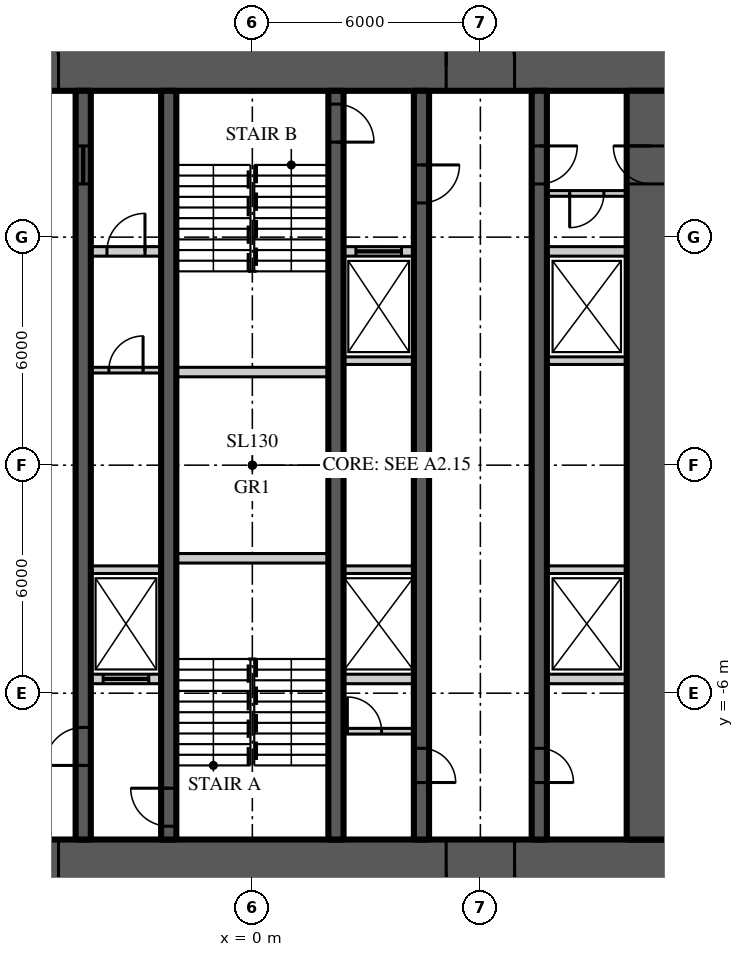
"""IFC4 building model, lengths in metres.
Left out: names, types, materials, properties, quantities, classifications, styles, units other than length and angle.
Written with IfcOpenShell. Run it as: python <this file> out.ifc"""

import sys

from ifc_helpers import new_model, si_unit, direction, frame, frame_2d, origin, place, context, subcontext, project, spatial, rectangle, extrude, element, fill, save


model = new_model("IFC4")
c1 = context("Model", 3, precision=1e-05, world=origin(), true_north=direction((0.0, 1.0)))
c2 = subcontext(c1, "Body", "Model", "MODEL_VIEW")
j1 = project(units=[si_unit("LENGTHUNIT", "METRE"), si_unit("PLANEANGLEUNIT", "RADIAN")], contexts=[c1])
p1 = place(None, origin())
s1 = spatial("IfcSite", under=j1, at=p1, CompositionType="ELEMENT")
p2 = place(p1, origin())
s2 = spatial("IfcBuilding", under=s1, at=p2, CompositionType="ELEMENT")
p3 = place(p2, frame((0.0, 0.0, 105.9)))
s3 = spatial("IfcBuildingStorey", under=s2, at=p3, CompositionType="ELEMENT", Elevation=105.9)
p4 = place(p3, frame((-11.15, 10.5, 0.0), z_axis=(0.0, 0.0, 1.0), x_axis=(1.0, 0.0, 0.0)))
e1 = element("IfcWall", 1, at=p4, inside=s3, PredefinedType="SHEAR", context=c2, shape_type="SweptSolid", body=[
    extrude(rectangle(XDim=22.3, YDim=1.3, at=frame_2d((11.15, 0.0))), origin(), (0.0, 0.0, 1.0), 3.9),
])
p5 = place(p4, frame((4.25, 0.0, 0.0)))
e2 = element("IfcOpeningElement", 2, at=p5, cuts=e1, PredefinedType="OPENING", context=c2, shape_type="SweptSolid", body=[
    extrude(rectangle(XDim=1.8, YDim=2.2, at=frame_2d((0.9, 1.1))), frame((0.0, 0.66, 0.0), z_axis=(0.0, -1.0, 0.0), x_axis=(1.0, 0.0, 0.0)), (0.0, 0.0, 1.0), 1.32),
])
p6 = place(p4, frame((16.25, 0.0, 0.0)))
e3 = element("IfcOpeningElement", 3, at=p6, cuts=e1, PredefinedType="OPENING", context=c2, shape_type="SweptSolid", body=[
    extrude(rectangle(XDim=1.8, YDim=2.2, at=frame_2d((0.9, 1.1))), frame((0.0, 0.66, 0.0), z_axis=(0.0, -1.0, 0.0), x_axis=(1.0, 0.0, 0.0)), (0.0, 0.0, 1.0), 1.32),
])
p7 = place(p3, frame((11.15, -10.5, 0.0), z_axis=(0.0, 0.0, 1.0), x_axis=(-1.0, 0.0, 0.0)))
e4 = element("IfcWall", 4, at=p7, inside=s3, PredefinedType="SHEAR", context=c2, shape_type="SweptSolid", body=[
    extrude(rectangle(XDim=22.3, YDim=1.3, at=frame_2d((11.15, 0.0))), origin(), (0.0, 0.0, 1.0), 3.9),
])
p8 = place(p7, frame((16.25, 0.0, 0.0)))
e5 = element("IfcOpeningElement", 5, at=p8, cuts=e4, PredefinedType="OPENING", context=c2, shape_type="SweptSolid", body=[
    extrude(rectangle(XDim=1.8, YDim=2.2, at=frame_2d((0.9, 1.1))), frame((0.0, 0.66, 0.0), z_axis=(0.0, -1.0, 0.0), x_axis=(1.0, 0.0, 0.0)), (0.0, 0.0, 1.0), 1.32),
])
p9 = place(p7, frame((4.25, 0.0, 0.0)))
e6 = element("IfcOpeningElement", 6, at=p9, cuts=e4, PredefinedType="OPENING", context=c2, shape_type="SweptSolid", body=[
    extrude(rectangle(XDim=1.8, YDim=2.2, at=frame_2d((0.9, 1.1))), frame((0.0, 0.66, 0.0), z_axis=(0.0, -1.0, 0.0), x_axis=(1.0, 0.0, 0.0)), (0.0, 0.0, 1.0), 1.32),
])
p10 = place(p3, frame((10.5, -9.85, 0.0), z_axis=(0.0, 0.0, 1.0), x_axis=(0.0, 1.0, 0.0)))
e7 = element("IfcWall", 7, at=p10, inside=s3, PredefinedType="SHEAR", context=c2, shape_type="SweptSolid", body=[
    extrude(rectangle(XDim=19.7, YDim=1.3, at=frame_2d((9.85, 0.0))), origin(), (0.0, 0.0, 1.0), 3.9),
])
p11 = place(p10, frame((17.25, 0.0, 0.0)))
e8 = element("IfcOpeningElement", 8, at=p11, cuts=e7, PredefinedType="OPENING", context=c2, shape_type="SweptSolid", body=[
    extrude(rectangle(XDim=1.0, YDim=2.2, at=frame_2d((0.5, 1.1))), frame((0.0, 0.66, 0.0), z_axis=(0.0, -1.0, 0.0), x_axis=(1.0, 0.0, 0.0)), (0.0, 0.0, 1.0), 1.32),
])
p12 = place(p3, frame((7.55, 9.85, 0.0), z_axis=(0.0, 0.0, 1.0), x_axis=(0.0, -1.0, 0.0)))
e9 = element("IfcWall", 9, at=p12, inside=s3, PredefinedType="SHEAR", context=c2, shape_type="SweptSolid", body=[
    extrude(rectangle(XDim=19.7, YDim=0.4, at=frame_2d((9.85, 0.0))), origin(), (0.0, 0.0, 1.0), 3.9),
])
p13 = place(p12, frame((1.45, 0.0, 0.0)))
e10 = element("IfcOpeningElement", 10, at=p13, cuts=e9, PredefinedType="OPENING", context=c2, shape_type="SweptSolid", body=[
    extrude(rectangle(XDim=1.0, YDim=2.2, at=frame_2d((0.5, 1.1))), frame((0.0, 0.21, 0.0), z_axis=(0.0, -1.0, 0.0), x_axis=(1.0, 0.0, 0.0)), (0.0, 0.0, 1.0), 0.42),
])
p14 = place(p12, frame((17.3, 0.0, 0.0)))
e11 = element("IfcOpeningElement", 11, at=p14, cuts=e9, PredefinedType="OPENING", context=c2, shape_type="SweptSolid", body=[
    extrude(rectangle(XDim=0.9, YDim=2.1, at=frame_2d((0.45, 1.05))), frame((0.0, 0.21, 0.0), z_axis=(0.0, -1.0, 0.0), x_axis=(1.0, 0.0, 0.0)), (0.0, 0.0, 1.0), 0.42),
])
p15 = place(p3, frame((-4.45, -9.85, 0.0), z_axis=(0.0, 0.0, 1.0), x_axis=(0.0, 1.0, 0.0)))
e12 = element("IfcWall", 12, at=p15, inside=s3, PredefinedType="SHEAR", context=c2, shape_type="SweptSolid", body=[
    extrude(rectangle(XDim=19.7, YDim=0.4, at=frame_2d((9.85, 0.0))), origin(), (0.0, 0.0, 1.0), 3.9),
])
p16 = place(p15, frame((1.95, 0.0, 0.0)))
e13 = element("IfcOpeningElement", 13, at=p16, cuts=e12, PredefinedType="OPENING", context=c2, shape_type="SweptSolid", body=[
    extrude(rectangle(XDim=1.0, YDim=2.2, at=frame_2d((0.5, 1.1))), frame((0.0, 0.21, 0.0), z_axis=(0.0, -1.0, 0.0), x_axis=(1.0, 0.0, 0.0)), (0.0, 0.0, 1.0), 0.42),
])
p17 = place(p15, frame((17.25, 0.0, 0.0)))
e14 = element("IfcOpeningElement", 14, at=p17, cuts=e12, PredefinedType="OPENING", context=c2, shape_type="SweptSolid", body=[
    extrude(rectangle(XDim=1.0, YDim=2.1, at=frame_2d((0.5, 1.05))), frame((0.0, 0.21, 0.0), z_axis=(0.0, -1.0, 0.0), x_axis=(1.0, 0.0, 0.0)), (0.0, 0.0, 1.0), 0.42),
])
p18 = place(p3, frame((4.45, 9.85, 0.0), z_axis=(0.0, 0.0, 1.0), x_axis=(0.0, -1.0, 0.0)))
e15 = element("IfcWall", 15, at=p18, inside=s3, PredefinedType="SHEAR", context=c2, shape_type="SweptSolid", body=[
    extrude(rectangle(XDim=19.7, YDim=0.4, at=frame_2d((9.85, 0.0))), origin(), (0.0, 0.0, 1.0), 3.9),
])
p19 = place(p18, frame((1.95, 0.0, 0.0)))
e16 = element("IfcOpeningElement", 16, at=p19, cuts=e15, PredefinedType="OPENING", context=c2, shape_type="SweptSolid", body=[
    extrude(rectangle(XDim=1.0, YDim=2.2, at=frame_2d((0.5, 1.1))), frame((0.0, 0.21, 0.0), z_axis=(0.0, -1.0, 0.0), x_axis=(1.0, 0.0, 0.0)), (0.0, 0.0, 1.0), 0.42),
])
p20 = place(p18, frame((17.3, 0.0, 0.0)))
e17 = element("IfcOpeningElement", 17, at=p20, cuts=e15, PredefinedType="OPENING", context=c2, shape_type="SweptSolid", body=[
    extrude(rectangle(XDim=0.9, YDim=2.1, at=frame_2d((0.45, 1.05))), frame((0.0, 0.21, 0.0), z_axis=(0.0, -1.0, 0.0), x_axis=(1.0, 0.0, 0.0)), (0.0, 0.0, 1.0), 0.42),
])
p21 = place(p3, frame((-2.2, -9.85, 0.0), z_axis=(0.0, 0.0, 1.0), x_axis=(0.0, 1.0, 0.0)))
e18 = element("IfcWall", 18, at=p21, inside=s3, PredefinedType="SHEAR", context=c2, shape_type="SweptSolid", body=[
    extrude(rectangle(XDim=19.7, YDim=0.4, at=frame_2d((9.85, 0.0))), origin(), (0.0, 0.0, 1.0), 3.9),
])
p22 = place(p21, frame((0.35, 0.0, 0.0)))
e19 = element("IfcOpeningElement", 19, at=p22, cuts=e18, PredefinedType="OPENING", context=c2, shape_type="SweptSolid", body=[
    extrude(rectangle(XDim=1.0, YDim=2.2, at=frame_2d((0.5, 1.1))), frame((0.0, 0.21, 0.0), z_axis=(0.0, -1.0, 0.0), x_axis=(1.0, 0.0, 0.0)), (0.0, 0.0, 1.0), 0.42),
])
p23 = place(p3, frame((2.2, 9.85, 0.0), z_axis=(0.0, 0.0, 1.0), x_axis=(0.0, -1.0, 0.0)))
e20 = element("IfcWall", 20, at=p23, inside=s3, PredefinedType="SHEAR", context=c2, shape_type="SweptSolid", body=[
    extrude(rectangle(XDim=19.7, YDim=0.4, at=frame_2d((9.85, 0.0))), origin(), (0.0, 0.0, 1.0), 3.9),
])
p24 = place(p23, frame((0.35, 0.0, 0.0)))
e21 = element("IfcOpeningElement", 21, at=p24, cuts=e20, PredefinedType="OPENING", context=c2, shape_type="SweptSolid", body=[
    extrude(rectangle(XDim=1.0, YDim=2.2, at=frame_2d((0.5, 1.1))), frame((0.0, 0.21, 0.0), z_axis=(0.0, -1.0, 0.0), x_axis=(1.0, 0.0, 0.0)), (0.0, 0.0, 1.0), 0.42),
])
p25 = place(p3, frame((-4.25, 5.625, 0.0), z_axis=(0.0, 0.0, 1.0), x_axis=(1.0, 0.0, 0.0)))
e22 = element("IfcWall", 22, at=p25, inside=s3, PredefinedType="SOLIDWALL", context=c2, shape_type="SweptSolid", body=[
    extrude(rectangle(XDim=1.85, YDim=0.25, at=frame_2d((0.925, 0.0))), origin(), (0.0, 0.0, 1.0), 3.7),
])
p26 = place(p25, frame((0.425, 0.0, 0.0)))
e23 = element("IfcOpeningElement", 23, at=p26, cuts=e22, PredefinedType="OPENING", context=c2, shape_type="SweptSolid", body=[
    extrude(rectangle(XDim=1.0, YDim=2.2, at=frame_2d((0.5, 1.1))), frame((0.0, 0.135, 0.0), z_axis=(0.0, -1.0, 0.0), x_axis=(1.0, 0.0, 0.0)), (0.0, 0.0, 1.0), 0.27),
])
p27 = place(p3, frame((2.4, 5.625, 0.0), z_axis=(0.0, 0.0, 1.0), x_axis=(1.0, 0.0, 0.0)))
e24 = element("IfcWall", 24, at=p27, inside=s3, PredefinedType="SOLIDWALL", context=c2, shape_type="SweptSolid", body=[
    extrude(rectangle(XDim=1.85, YDim=0.25, at=frame_2d((0.925, 0.0))), origin(), (0.0, 0.0, 1.0), 3.7),
])
p28 = place(p27, frame((0.325, 0.0, 0.0)))
e25 = element("IfcOpeningElement", 25, at=p28, cuts=e24, PredefinedType="OPENING", context=c2, shape_type="SweptSolid", body=[
    extrude(rectangle(XDim=1.2, YDim=2.2, at=frame_2d((0.6, 1.1))), frame((0.0, 0.135, 0.0), z_axis=(0.0, -1.0, 0.0), x_axis=(1.0, 0.0, 0.0)), (0.0, 0.0, 1.0), 0.27),
])
p29 = place(p3, frame((7.75, 5.625, 0.0), z_axis=(0.0, 0.0, 1.0), x_axis=(1.0, 0.0, 0.0)))
e26 = element("IfcWall", 26, at=p29, inside=s3, PredefinedType="SOLIDWALL", context=c2, shape_type="SweptSolid", body=[
    extrude(rectangle(XDim=2.1, YDim=0.25, at=frame_2d((1.05, 0.0))), origin(), (0.0, 0.0, 1.0), 3.7),
])
p30 = place(p3, frame((-4.25, -5.625, 0.0), z_axis=(0.0, 0.0, 1.0), x_axis=(1.0, 0.0, 0.0)))
e27 = element("IfcWall", 27, at=p30, inside=s3, PredefinedType="SOLIDWALL", context=c2, shape_type="SweptSolid", body=[
    extrude(rectangle(XDim=1.85, YDim=0.25, at=frame_2d((0.925, 0.0))), origin(), (0.0, 0.0, 1.0), 3.7),
])
p31 = place(p30, frame((0.325, 0.0, 0.0)))
e28 = element("IfcOpeningElement", 28, at=p31, cuts=e27, PredefinedType="OPENING", context=c2, shape_type="SweptSolid", body=[
    extrude(rectangle(XDim=1.2, YDim=2.2, at=frame_2d((0.6, 1.1))), frame((0.0, 0.135, 0.0), z_axis=(0.0, -1.0, 0.0), x_axis=(1.0, 0.0, 0.0)), (0.0, 0.0, 1.0), 0.27),
])
p32 = place(p3, frame((2.4, -5.625, 0.0), z_axis=(0.0, 0.0, 1.0), x_axis=(1.0, 0.0, 0.0)))
e29 = element("IfcWall", 29, at=p32, inside=s3, PredefinedType="SOLIDWALL", context=c2, shape_type="SweptSolid", body=[
    extrude(rectangle(XDim=1.85, YDim=0.25, at=frame_2d((0.925, 0.0))), origin(), (0.0, 0.0, 1.0), 3.7),
])
p33 = place(p3, frame((7.75, -5.625, 0.0), z_axis=(0.0, 0.0, 1.0), x_axis=(1.0, 0.0, 0.0)))
e30 = element("IfcWall", 30, at=p33, inside=s3, PredefinedType="SOLIDWALL", context=c2, shape_type="SweptSolid", body=[
    extrude(rectangle(XDim=2.1, YDim=0.25, at=frame_2d((1.05, 0.0))), origin(), (0.0, 0.0, 1.0), 3.7),
])
for number, where, z_axis, x_axis in (
    (31, (-2.0, -2.45, 0.0), (0.0, 0.0, 1.0), (1.0, 0.0, 0.0)),
    (32, (-2.0, 2.45, 0.0), (0.0, 0.0, 1.0), (1.0, 0.0, 0.0)),
):
    element("IfcWall", number, at=place(p3, frame(where, z_axis=z_axis, x_axis=x_axis)), inside=s3, PredefinedType="SOLIDWALL", context=c2, shape_type="SweptSolid", body=[
        extrude(rectangle(XDim=4.0, YDim=0.25, at=frame_2d((2.0, 0.0))), origin(), (0.0, 0.0, 1.0), 3.7),
    ])
for number, where, z_axis, x_axis in (
    (33, (-4.25, -2.75, 0.0), (0.0, 0.0, 1.0), (1.0, 0.0, 0.0)),
    (34, (2.4, -2.75, 0.0), (0.0, 0.0, 1.0), (1.0, 0.0, 0.0)),
):
    element("IfcWall", number, at=place(p3, frame(where, z_axis=z_axis, x_axis=x_axis)), inside=s3, PredefinedType="SOLIDWALL", context=c2, shape_type="SweptSolid", body=[
        extrude(rectangle(XDim=1.85, YDim=0.2, at=frame_2d((0.925, 0.0))), origin(), (0.0, 0.0, 1.0), 3.7),
    ])
p34 = place(p3, frame((7.75, -2.75, 0.0), z_axis=(0.0, 0.0, 1.0), x_axis=(1.0, 0.0, 0.0)))
e35 = element("IfcWall", 35, at=p34, inside=s3, PredefinedType="SOLIDWALL", context=c2, shape_type="SweptSolid", body=[
    extrude(rectangle(XDim=2.1, YDim=0.2, at=frame_2d((1.05, 0.0))), origin(), (0.0, 0.0, 1.0), 3.7),
])
p35 = place(p3, frame((2.4, 2.75, 0.0), z_axis=(0.0, 0.0, 1.0), x_axis=(1.0, 0.0, 0.0)))
e36 = element("IfcWall", 36, at=p35, inside=s3, PredefinedType="SOLIDWALL", context=c2, shape_type="SweptSolid", body=[
    extrude(rectangle(XDim=1.85, YDim=0.2, at=frame_2d((0.925, 0.0))), origin(), (0.0, 0.0, 1.0), 3.7),
])
p36 = place(p3, frame((7.75, 2.75, 0.0), z_axis=(0.0, 0.0, 1.0), x_axis=(1.0, 0.0, 0.0)))
e37 = element("IfcWall", 37, at=p36, inside=s3, PredefinedType="SOLIDWALL", context=c2, shape_type="SweptSolid", body=[
    extrude(rectangle(XDim=2.1, YDim=0.2, at=frame_2d((1.05, 0.0))), origin(), (0.0, 0.0, 1.0), 3.7),
])
p37 = place(p3, frame((-4.25, 2.5, 0.0), z_axis=(0.0, 0.0, 1.0), x_axis=(1.0, 0.0, 0.0)))
e38 = element("IfcWall", 38, at=p37, inside=s3, PredefinedType="SOLIDWALL", context=c2, shape_type="SweptSolid", body=[
    extrude(rectangle(XDim=1.85, YDim=0.15, at=frame_2d((0.925, 0.0))), origin(), (0.0, 0.0, 1.0), 3.77),
])
p38 = place(p37, frame((0.475, 0.0, 0.0)))
e39 = element("IfcOpeningElement", 39, at=p38, cuts=e38, PredefinedType="OPENING", context=c2, shape_type="SweptSolid", body=[
    extrude(rectangle(XDim=0.9, YDim=2.1, at=frame_2d((0.45, 1.05))), frame((0.0, 0.085, 0.0), z_axis=(0.0, -1.0, 0.0), x_axis=(1.0, 0.0, 0.0)), (0.0, 0.0, 1.0), 0.17),
])
p39 = place(p3, frame((2.4, -7.0, 0.0), z_axis=(0.0, 0.0, 1.0), x_axis=(1.0, 0.0, 0.0)))
e40 = element("IfcWall", 40, at=p39, inside=s3, PredefinedType="SOLIDWALL", context=c2, shape_type="SweptSolid", body=[
    extrude(rectangle(XDim=1.85, YDim=0.15, at=frame_2d((0.925, 0.0))), origin(), (0.0, 0.0, 1.0), 3.77),
])
p40 = place(p39, frame((0.1, 0.0, 0.0)))
e41 = element("IfcOpeningElement", 41, at=p40, cuts=e40, PredefinedType="OPENING", context=c2, shape_type="SweptSolid", body=[
    extrude(rectangle(XDim=0.9, YDim=2.1, at=frame_2d((0.45, 1.05))), frame((0.0, 0.085, 0.0), z_axis=(0.0, -1.0, 0.0), x_axis=(1.0, 0.0, 0.0)), (0.0, 0.0, 1.0), 0.17),
])
p41 = place(p3, frame((9.85, 7.15, 0.0), z_axis=(0.0, 0.0, 1.0), x_axis=(-1.0, 0.0, 0.0)))
e42 = element("IfcWall", 42, at=p41, inside=s3, PredefinedType="SOLIDWALL", context=c2, shape_type="SweptSolid", body=[
    extrude(rectangle(XDim=2.1, YDim=0.15, at=frame_2d((1.05, 0.0))), origin(), (0.0, 0.0, 1.0), 3.77),
])
p42 = place(p41, frame((0.6, 0.0, 0.0)))
e43 = element("IfcOpeningElement", 43, at=p42, cuts=e42, PredefinedType="OPENING", context=c2, shape_type="SweptSolid", body=[
    extrude(rectangle(XDim=0.9, YDim=2.1, at=frame_2d((0.45, 1.05))), frame((0.0, 0.085, 0.0), z_axis=(0.0, -1.0, 0.0), x_axis=(1.0, 0.0, 0.0)), (0.0, 0.0, 1.0), 0.17),
])
p43 = place(p5, origin())
e44 = element("IfcDoor", 44, at=p43, inside=s3, OperationType="DOUBLE_DOOR_DOUBLE_SWING", PredefinedType="DOOR", context=c2, shape_type="SweptSolid", body=[
    extrude(rectangle(XDim=1.8, YDim=2.2, at=frame_2d((0.9, 1.1))), frame((0.0, 0.025, 0.0), z_axis=(0.0, -1.0, 0.0), x_axis=(1.0, 0.0, 0.0)), (0.0, 0.0, 1.0), 0.05),
])
fill(e2, e44)
p44 = place(p8, origin())
e45 = element("IfcDoor", 45, at=p44, inside=s3, OperationType="DOUBLE_DOOR_DOUBLE_SWING", PredefinedType="DOOR", context=c2, shape_type="SweptSolid", body=[
    extrude(rectangle(XDim=1.8, YDim=2.2, at=frame_2d((0.9, 1.1))), frame((0.0, 0.025, 0.0), z_axis=(0.0, -1.0, 0.0), x_axis=(1.0, 0.0, 0.0)), (0.0, 0.0, 1.0), 0.05),
])
fill(e5, e45)
p45 = place(p6, origin())
e46 = element("IfcDoor", 46, at=p45, inside=s3, OperationType="DOUBLE_DOOR_DOUBLE_SWING", PredefinedType="DOOR", context=c2, shape_type="SweptSolid", body=[
    extrude(rectangle(XDim=1.8, YDim=2.2, at=frame_2d((0.9, 1.1))), frame((0.0, 0.025, 0.0), z_axis=(0.0, -1.0, 0.0), x_axis=(1.0, 0.0, 0.0)), (0.0, 0.0, 1.0), 0.05),
])
fill(e3, e46)
p46 = place(p9, origin())
e47 = element("IfcDoor", 47, at=p46, inside=s3, OperationType="DOUBLE_DOOR_DOUBLE_SWING", PredefinedType="DOOR", context=c2, shape_type="SweptSolid", body=[
    extrude(rectangle(XDim=1.8, YDim=2.2, at=frame_2d((0.9, 1.1))), frame((0.0, 0.025, 0.0), z_axis=(0.0, -1.0, 0.0), x_axis=(1.0, 0.0, 0.0)), (0.0, 0.0, 1.0), 0.05),
])
fill(e6, e47)
p47 = place(p13, origin())
e48 = element("IfcDoor", 48, at=p47, inside=s3, OperationType="SINGLE_SWING_LEFT", PredefinedType="DOOR", context=c2, shape_type="SweptSolid", body=[
    extrude(rectangle(XDim=1.0, YDim=2.2, at=frame_2d((0.5, 1.1))), frame((0.0, 0.025, 0.0), z_axis=(0.0, -1.0, 0.0), x_axis=(1.0, 0.0, 0.0)), (0.0, 0.0, 1.0), 0.05),
])
fill(e10, e48)
p48 = place(p11, origin())
e49 = element("IfcDoor", 49, at=p48, inside=s3, OperationType="SINGLE_SWING_RIGHT", PredefinedType="DOOR", context=c2, shape_type="SweptSolid", body=[
    extrude(rectangle(XDim=1.0, YDim=2.2, at=frame_2d((0.5, 1.1))), frame((0.0, 0.025, 0.0), z_axis=(0.0, -1.0, 0.0), x_axis=(1.0, 0.0, 0.0)), (0.0, 0.0, 1.0), 0.05),
])
fill(e8, e49)
p49 = place(p16, origin())
e50 = element("IfcDoor", 50, at=p49, inside=s3, OperationType="SINGLE_SWING_LEFT", PredefinedType="DOOR", context=c2, shape_type="SweptSolid", body=[
    extrude(rectangle(XDim=1.0, YDim=2.2, at=frame_2d((0.5, 1.1))), frame((0.0, 0.025, 0.0), z_axis=(0.0, -1.0, 0.0), x_axis=(1.0, 0.0, 0.0)), (0.0, 0.0, 1.0), 0.05),
])
fill(e13, e50)
p50 = place(p22, origin())
e51 = element("IfcDoor", 51, at=p50, inside=s3, OperationType="SINGLE_SWING_RIGHT", PredefinedType="DOOR", context=c2, shape_type="SweptSolid", body=[
    extrude(rectangle(XDim=1.0, YDim=2.2, at=frame_2d((0.5, 1.1))), frame((0.0, 0.025, 0.0), z_axis=(0.0, -1.0, 0.0), x_axis=(1.0, 0.0, 0.0)), (0.0, 0.0, 1.0), 0.05),
])
fill(e19, e51)
p51 = place(p19, origin())
e52 = element("IfcDoor", 52, at=p51, inside=s3, OperationType="SINGLE_SWING_LEFT", PredefinedType="DOOR", context=c2, shape_type="SweptSolid", body=[
    extrude(rectangle(XDim=1.0, YDim=2.2, at=frame_2d((0.5, 1.1))), frame((0.0, 0.025, 0.0), z_axis=(0.0, -1.0, 0.0), x_axis=(1.0, 0.0, 0.0)), (0.0, 0.0, 1.0), 0.05),
])
fill(e16, e52)
p52 = place(p24, origin())
e53 = element("IfcDoor", 53, at=p52, inside=s3, OperationType="SINGLE_SWING_RIGHT", PredefinedType="DOOR", context=c2, shape_type="SweptSolid", body=[
    extrude(rectangle(XDim=1.0, YDim=2.2, at=frame_2d((0.5, 1.1))), frame((0.0, 0.025, 0.0), z_axis=(0.0, -1.0, 0.0), x_axis=(1.0, 0.0, 0.0)), (0.0, 0.0, 1.0), 0.05),
])
fill(e21, e53)
p53 = place(p17, origin())
e54 = element("IfcDoor", 54, at=p53, inside=s3, OperationType="SLIDING_TO_LEFT", PredefinedType="DOOR", context=c2, shape_type="SweptSolid", body=[
    extrude(rectangle(XDim=1.0, YDim=2.1, at=frame_2d((0.5, 1.05))), frame((0.0, 0.025, 0.0), z_axis=(0.0, -1.0, 0.0), x_axis=(1.0, 0.0, 0.0)), (0.0, 0.0, 1.0), 0.05),
])
fill(e14, e54)
p54 = place(p14, origin())
e55 = element("IfcDoor", 55, at=p54, inside=s3, OperationType="SINGLE_SWING_RIGHT", PredefinedType="DOOR", context=c2, shape_type="SweptSolid", body=[
    extrude(rectangle(XDim=0.9, YDim=2.1, at=frame_2d((0.45, 1.05))), frame((0.0, 0.025, 0.0), z_axis=(0.0, -1.0, 0.0), x_axis=(1.0, 0.0, 0.0)), (0.0, 0.0, 1.0), 0.05),
])
fill(e11, e55)
p55 = place(p20, origin())
e56 = element("IfcDoor", 56, at=p55, inside=s3, OperationType="SINGLE_SWING_RIGHT", PredefinedType="DOOR", context=c2, shape_type="SweptSolid", body=[
    extrude(rectangle(XDim=0.9, YDim=2.1, at=frame_2d((0.45, 1.05))), frame((0.0, 0.025, 0.0), z_axis=(0.0, -1.0, 0.0), x_axis=(1.0, 0.0, 0.0)), (0.0, 0.0, 1.0), 0.05),
])
fill(e17, e56)
p56 = place(p31, origin())
e57 = element("IfcDoor", 57, at=p56, inside=s3, OperationType="SLIDING_TO_LEFT", PredefinedType="DOOR", context=c2, shape_type="SweptSolid", body=[
    extrude(rectangle(XDim=1.2, YDim=2.2, at=frame_2d((0.6, 1.1))), frame((0.0, 0.025, 0.0), z_axis=(0.0, -1.0, 0.0), x_axis=(1.0, 0.0, 0.0)), (0.0, 0.0, 1.0), 0.05),
])
fill(e28, e57)
p57 = place(p28, origin())
e58 = element("IfcDoor", 58, at=p57, inside=s3, OperationType="SLIDING_TO_LEFT", PredefinedType="DOOR", context=c2, shape_type="SweptSolid", body=[
    extrude(rectangle(XDim=1.2, YDim=2.2, at=frame_2d((0.6, 1.1))), frame((0.0, 0.025, 0.0), z_axis=(0.0, -1.0, 0.0), x_axis=(1.0, 0.0, 0.0)), (0.0, 0.0, 1.0), 0.05),
])
fill(e25, e58)
p58 = place(p38, origin())
e59 = element("IfcDoor", 59, at=p58, inside=s3, OperationType="SINGLE_SWING_RIGHT", PredefinedType="DOOR", context=c2, shape_type="SweptSolid", body=[
    extrude(rectangle(XDim=0.9, YDim=2.1, at=frame_2d((0.45, 1.05))), frame((0.0, 0.025, 0.0), z_axis=(0.0, -1.0, 0.0), x_axis=(1.0, 0.0, 0.0)), (0.0, 0.0, 1.0), 0.05),
])
fill(e39, e59)
p59 = place(p26, origin())
e60 = element("IfcDoor", 60, at=p59, inside=s3, OperationType="SINGLE_SWING_RIGHT", PredefinedType="DOOR", context=c2, shape_type="SweptSolid", body=[
    extrude(rectangle(XDim=1.0, YDim=2.2, at=frame_2d((0.5, 1.1))), frame((0.0, 0.025, 0.0), z_axis=(0.0, -1.0, 0.0), x_axis=(1.0, 0.0, 0.0)), (0.0, 0.0, 1.0), 0.05),
])
fill(e23, e60)
p60 = place(p40, origin())
e61 = element("IfcDoor", 61, at=p60, inside=s3, OperationType="SINGLE_SWING_LEFT", PredefinedType="DOOR", context=c2, shape_type="SweptSolid", body=[
    extrude(rectangle(XDim=0.9, YDim=2.1, at=frame_2d((0.45, 1.05))), frame((0.0, 0.025, 0.0), z_axis=(0.0, -1.0, 0.0), x_axis=(1.0, 0.0, 0.0)), (0.0, 0.0, 1.0), 0.05),
])
fill(e41, e61)
p61 = place(p42, origin())
e62 = element("IfcDoor", 62, at=p61, inside=s3, OperationType="SINGLE_SWING_RIGHT", PredefinedType="DOOR", context=c2, shape_type="SweptSolid", body=[
    extrude(rectangle(XDim=0.9, YDim=2.1, at=frame_2d((0.45, 1.05))), frame((0.0, 0.025, 0.0), z_axis=(0.0, -1.0, 0.0), x_axis=(1.0, 0.0, 0.0)), (0.0, 0.0, 1.0), 0.05),
])
fill(e43, e62)
save(model, sys.argv[1])
